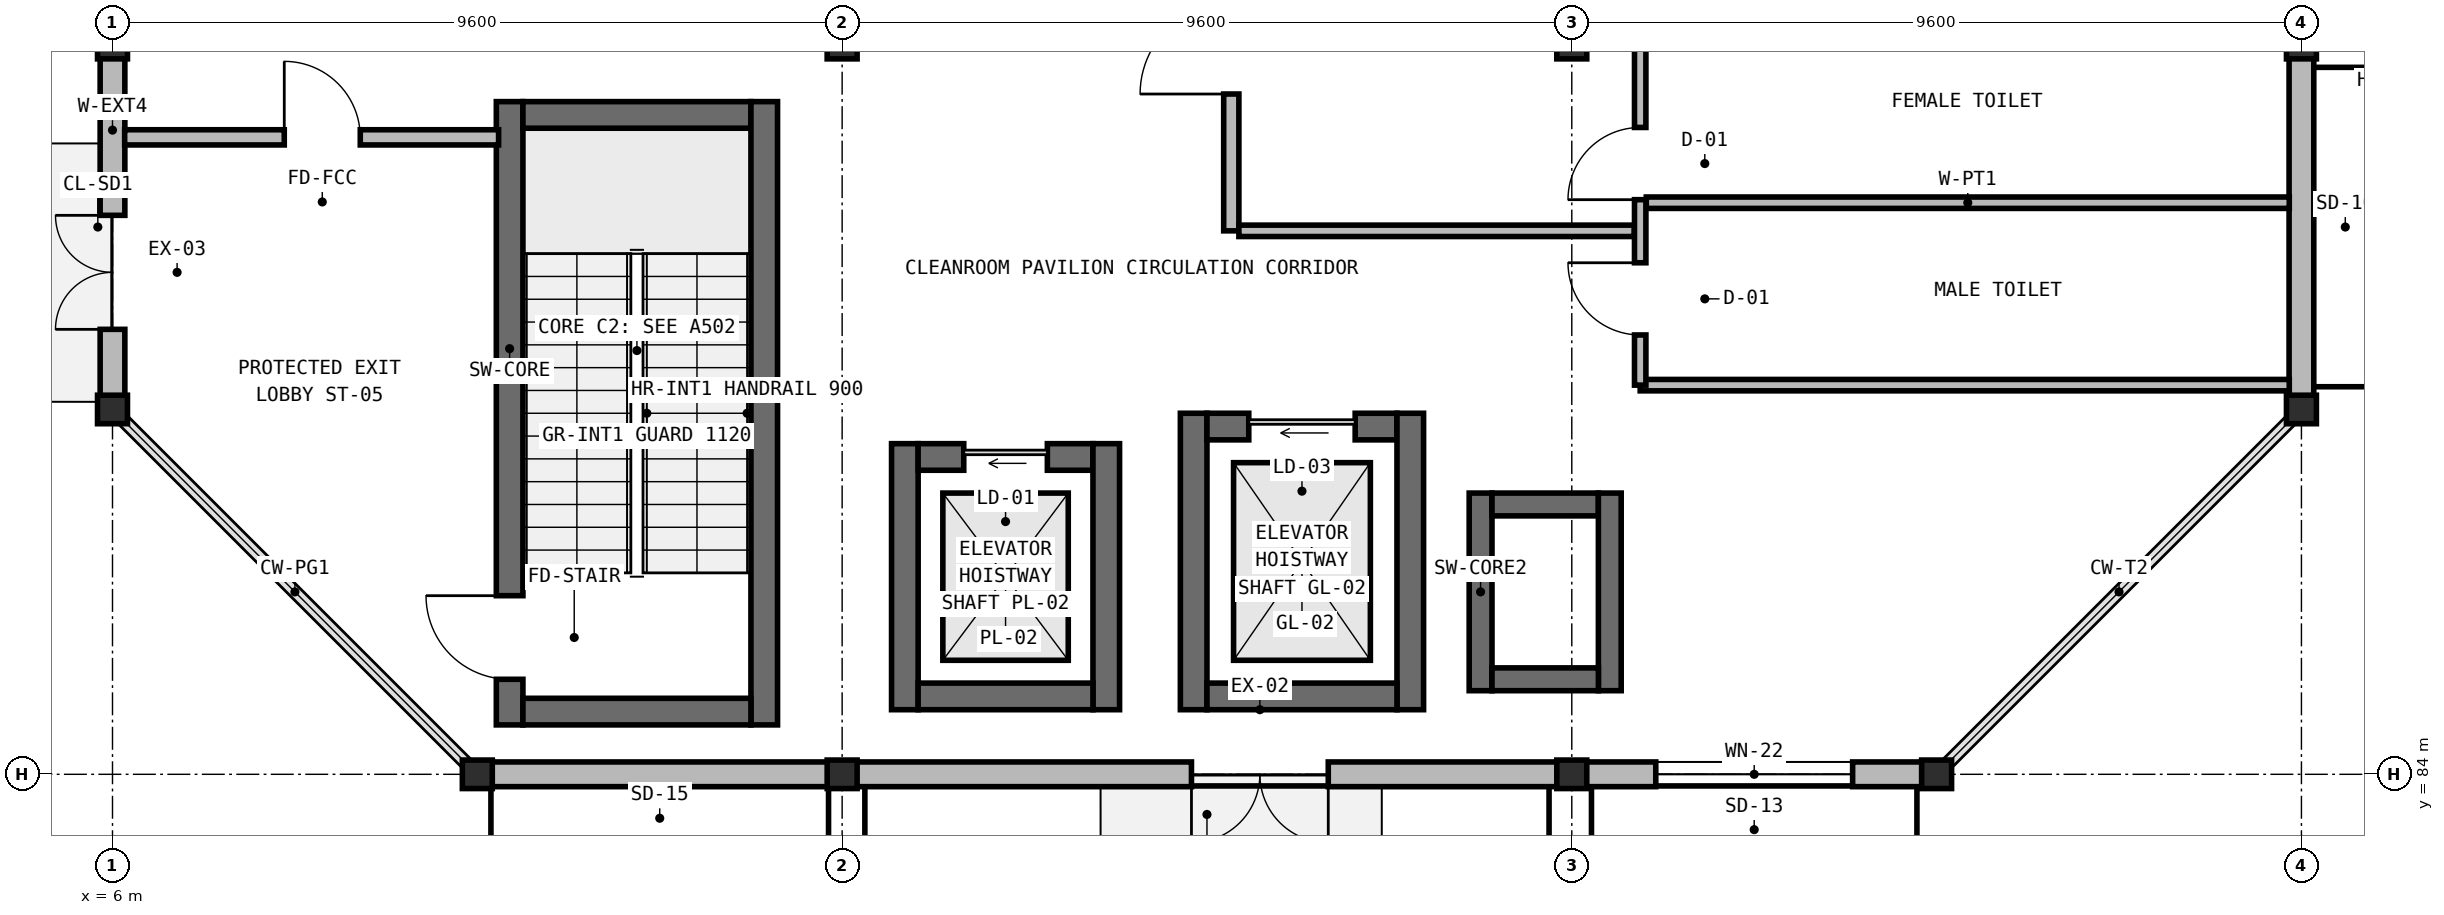
"""IFC4 building model, lengths in metres.
Left out: names, types, materials, properties, quantities, classifications, styles, units other than length and angle.
Written with IfcOpenShell. Run it as: python <this file> out.ifc"""

import sys

from ifc_helpers import new_model, si_unit, direction, frame, frame_2d, origin, origin_2d, place, context, subcontext, project, spatial, rectangle, i_section, extrude, element, fill, save


model = new_model("IFC4")
c1 = context("Model", 3, precision=1e-05, world=origin(), true_north=direction((0.0, 1.0)))
c2 = subcontext(c1, "Body", "Model", "MODEL_VIEW")
j1 = project(units=[si_unit("LENGTHUNIT", "METRE"), si_unit("PLANEANGLEUNIT", "RADIAN")], contexts=[c1])
p1 = place(None, origin())
s1 = spatial("IfcSite", under=j1, at=p1, CompositionType="ELEMENT")
p2 = place(p1, origin())
s2 = spatial("IfcBuilding", under=s1, at=p2, CompositionType="ELEMENT")
p3 = place(p2, origin())
s3 = spatial("IfcBuildingStorey", under=s2, at=p3, CompositionType="ELEMENT", Elevation=0.0)
p4 = place(p3, frame((11.225, 84.65, 0.0), z_axis=(0.0, 0.0, 1.0), x_axis=(0.0, 1.0, 0.0)))
e1 = element("IfcWall", 1, at=p4, inside=s3, PredefinedType="SHEAR", context=c2, shape_type="SweptSolid", body=[
    extrude(rectangle(XDim=8.2, YDim=0.35, at=frame_2d((4.1, 0.0))), origin(), (0.0, 0.0, 1.0), 5.25),
])
p5 = place(p4, frame((0.6, 0.0, 0.0)))
e2 = element("IfcOpeningElement", 2, at=p5, cuts=e1, PredefinedType="OPENING", context=c2, shape_type="SweptSolid", body=[
    extrude(rectangle(XDim=1.1, YDim=2.15, at=frame_2d((0.55, 1.075))), frame((0.0, 0.185, 0.0), z_axis=(0.0, -1.0, 0.0), x_axis=(1.0, 0.0, 0.0)), (0.0, 0.0, 1.0), 0.37),
])
p6 = place(p3, frame((11.4, 92.675, 0.0), z_axis=(0.0, 0.0, 1.0), x_axis=(1.0, 0.0, 0.0)))
e3 = element("IfcWall", 3, at=p6, inside=s3, PredefinedType="SHEAR", context=c2, shape_type="SweptSolid", body=[
    extrude(rectangle(XDim=3.0, YDim=0.35, at=frame_2d((1.5, 0.0))), origin(), (0.0, 0.0, 1.0), 5.25),
])
p7 = place(p3, frame((14.575, 92.85, 0.0), z_axis=(0.0, 0.0, 1.0), x_axis=(0.0, -1.0, 0.0)))
e4 = element("IfcWall", 4, at=p7, inside=s3, PredefinedType="SHEAR", context=c2, shape_type="SweptSolid", body=[
    extrude(rectangle(XDim=8.2, YDim=0.35, at=frame_2d((4.1, 0.0))), origin(), (0.0, 0.0, 1.0), 5.25),
])
p8 = place(p3, frame((14.4, 84.825, 0.0), z_axis=(0.0, 0.0, 1.0), x_axis=(-1.0, 0.0, 0.0)))
e5 = element("IfcWall", 5, at=p8, inside=s3, PredefinedType="SHEAR", context=c2, shape_type="SweptSolid", body=[
    extrude(rectangle(XDim=3.0, YDim=0.35, at=frame_2d((1.5, 0.0))), origin(), (0.0, 0.0, 1.0), 5.25),
])
p9 = place(p3, frame((16.425, 84.85, 0.0), z_axis=(0.0, 0.0, 1.0), x_axis=(0.0, 1.0, 0.0)))
e6 = element("IfcWall", 6, at=p9, inside=s3, PredefinedType="SHEAR", context=c2, shape_type="SweptSolid", body=[
    extrude(rectangle(XDim=3.5, YDim=0.35, at=frame_2d((1.75, 0.0))), origin(), (0.0, 0.0, 1.0), 5.25),
])
p10 = place(p3, frame((16.6, 88.175, 0.0), z_axis=(0.0, 0.0, 1.0), x_axis=(1.0, 0.0, 0.0)))
e7 = element("IfcWall", 7, at=p10, inside=s3, PredefinedType="SHEAR", context=c2, shape_type="SweptSolid", body=[
    extrude(rectangle(XDim=2.3, YDim=0.35, at=frame_2d((1.15, 0.0))), origin(), (0.0, 0.0, 1.0), 5.25),
])
p11 = place(p10, frame((0.6, 0.0, 0.0)))
e8 = element("IfcOpeningElement", 8, at=p11, cuts=e7, PredefinedType="OPENING", context=c2, shape_type="SweptSolid", body=[
    extrude(rectangle(XDim=1.1, YDim=2.15, at=frame_2d((0.55, 1.075))), frame((0.0, 0.185, 0.0), z_axis=(0.0, -1.0, 0.0), x_axis=(1.0, 0.0, 0.0)), (0.0, 0.0, 1.0), 0.37),
])
p12 = place(p3, frame((19.075, 88.35, 0.0), z_axis=(0.0, 0.0, 1.0), x_axis=(0.0, -1.0, 0.0)))
e9 = element("IfcWall", 9, at=p12, inside=s3, PredefinedType="SHEAR", context=c2, shape_type="SweptSolid", body=[
    extrude(rectangle(XDim=3.5, YDim=0.35, at=frame_2d((1.75, 0.0))), origin(), (0.0, 0.0, 1.0), 5.25),
])
p13 = place(p3, frame((18.9, 85.025, 0.0), z_axis=(0.0, 0.0, 1.0), x_axis=(-1.0, 0.0, 0.0)))
e10 = element("IfcWall", 10, at=p13, inside=s3, PredefinedType="SHEAR", context=c2, shape_type="SweptSolid", body=[
    extrude(rectangle(XDim=2.3, YDim=0.35, at=frame_2d((1.15, 0.0))), origin(), (0.0, 0.0, 1.0), 5.25),
])
p14 = place(p3, frame((20.225, 84.85, 0.0), z_axis=(0.0, 0.0, 1.0), x_axis=(0.0, 1.0, 0.0)))
e11 = element("IfcWall", 11, at=p14, inside=s3, PredefinedType="SHEAR", context=c2, shape_type="SweptSolid", body=[
    extrude(rectangle(XDim=3.9, YDim=0.35, at=frame_2d((1.95, 0.0))), origin(), (0.0, 0.0, 1.0), 5.25),
])
p15 = place(p3, frame((20.4, 88.575, 0.0), z_axis=(0.0, 0.0, 1.0), x_axis=(1.0, 0.0, 0.0)))
e12 = element("IfcWall", 12, at=p15, inside=s3, PredefinedType="SHEAR", context=c2, shape_type="SweptSolid", body=[
    extrude(rectangle(XDim=2.5, YDim=0.35, at=frame_2d((1.25, 0.0))), origin(), (0.0, 0.0, 1.0), 5.25),
])
p16 = place(p15, frame((0.55, 0.0, 0.0)))
e13 = element("IfcOpeningElement", 13, at=p16, cuts=e12, PredefinedType="OPENING", context=c2, shape_type="SweptSolid", body=[
    extrude(rectangle(XDim=1.4, YDim=2.3, at=frame_2d((0.7, 1.15))), frame((0.0, 0.185, 0.0), z_axis=(0.0, -1.0, 0.0), x_axis=(1.0, 0.0, 0.0)), (0.0, 0.0, 1.0), 0.37),
])
p17 = place(p3, frame((23.075, 88.75, 0.0), z_axis=(0.0, 0.0, 1.0), x_axis=(0.0, -1.0, 0.0)))
e14 = element("IfcWall", 14, at=p17, inside=s3, PredefinedType="SHEAR", context=c2, shape_type="SweptSolid", body=[
    extrude(rectangle(XDim=3.9, YDim=0.35, at=frame_2d((1.95, 0.0))), origin(), (0.0, 0.0, 1.0), 5.25),
])
p18 = place(p3, frame((22.9, 85.025, 0.0), z_axis=(0.0, 0.0, 1.0), x_axis=(-1.0, 0.0, 0.0)))
e15 = element("IfcWall", 15, at=p18, inside=s3, PredefinedType="SHEAR", context=c2, shape_type="SweptSolid", body=[
    extrude(rectangle(XDim=2.5, YDim=0.35, at=frame_2d((1.25, 0.0))), origin(), (0.0, 0.0, 1.0), 5.25),
])
for number, where, z_axis, x_axis in (
    (16, (6.0, 93.6, 0.0), (0.0, 0.0, 1.0), (1.0, 0.0, 0.0)),
    (17, (15.6, 84.0, 0.0), (0.0, 0.0, 1.0), (1.0, 0.0, 0.0)),
    (18, (15.6, 93.6, 0.0), (0.0, 0.0, 1.0), (1.0, 0.0, 0.0)),
    (19, (25.2, 84.0, 0.0), (0.0, 0.0, 1.0), (1.0, 0.0, 0.0)),
    (20, (25.2, 93.6, 0.0), (0.0, 0.0, 1.0), (1.0, 0.0, 0.0)),
    (21, (34.8, 93.6, 0.0), (0.0, 0.0, 1.0), (1.0, 0.0, 0.0)),
    (22, (10.8, 84.0, 0.0), (0.0, 0.0, 1.0), (1.0, 0.0, 0.0)),
    (23, (30.0, 84.0, 0.0), (0.0, 0.0, 1.0), (1.0, 0.0, 0.0)),
    (24, (34.8, 88.8, 0.0), (0.0, 0.0, 1.0), (1.0, 0.0, 0.0)),
    (25, (6.0, 88.8, 0.0), (0.0, 0.0, 1.0), (1.0, 0.0, 0.0)),
):
    element("IfcColumn", number, at=place(p3, frame(where, z_axis=z_axis, x_axis=x_axis)), inside=s3, PredefinedType="COLUMN", context=c2, shape_type="SweptSolid", body=[
        extrude(i_section(OverallWidth=0.394, OverallDepth=0.375, WebThickness=0.02, FlangeThickness=0.032, at=origin_2d()), origin(), (0.0, 0.0, 1.0), 5.25),
    ])
p19 = place(p3, frame((24.0, 85.1, 0.0), z_axis=(0.0, 0.0, 1.0), x_axis=(0.0, 1.0, 0.0)))
e26 = element("IfcWall", 26, at=p19, inside=s3, PredefinedType="SHEAR", context=c2, shape_type="SweptSolid", body=[
    extrude(rectangle(XDim=2.6, YDim=0.3, at=frame_2d((1.3, 0.0))), origin(), (0.0, 0.0, 1.0), 5.07),
])
p20 = place(p3, frame((24.15, 87.55, 0.0), z_axis=(0.0, 0.0, 1.0), x_axis=(1.0, 0.0, 0.0)))
e27 = element("IfcWall", 27, at=p20, inside=s3, PredefinedType="SHEAR", context=c2, shape_type="SweptSolid", body=[
    extrude(rectangle(XDim=1.4, YDim=0.3, at=frame_2d((0.7, 0.0))), origin(), (0.0, 0.0, 1.0), 5.07),
])
p21 = place(p3, frame((25.7, 87.7, 0.0), z_axis=(0.0, 0.0, 1.0), x_axis=(0.0, -1.0, 0.0)))
e28 = element("IfcWall", 28, at=p21, inside=s3, PredefinedType="SHEAR", context=c2, shape_type="SweptSolid", body=[
    extrude(rectangle(XDim=2.6, YDim=0.3, at=frame_2d((1.3, 0.0))), origin(), (0.0, 0.0, 1.0), 5.07),
])
p22 = place(p3, frame((25.55, 85.25, 0.0), z_axis=(0.0, 0.0, 1.0), x_axis=(-1.0, 0.0, 0.0)))
e29 = element("IfcWall", 29, at=p22, inside=s3, PredefinedType="SHEAR", context=c2, shape_type="SweptSolid", body=[
    extrude(rectangle(XDim=1.4, YDim=0.3, at=frame_2d((0.7, 0.0))), origin(), (0.0, 0.0, 1.0), 5.07),
])
p23 = place(p3, frame((6.0, 88.804, 0.0), z_axis=(0.0, 0.0, 1.0), x_axis=(0.0, 1.0, 0.0)))
e30 = element("IfcWall", 30, at=p23, inside=s3, PredefinedType="SOLIDWALL", context=c2, shape_type="SweptSolid", body=[
    extrude(rectangle(XDim=4.792, YDim=0.325, at=frame_2d((2.396, 0.0))), origin(), (0.0, 0.0, 1.0), 4.93),
])
p24 = place(p23, frame((1.05, 0.0, 0.0)))
e31 = element("IfcOpeningElement", 31, at=p24, cuts=e30, PredefinedType="OPENING", context=c2, shape_type="SweptSolid", body=[
    extrude(rectangle(XDim=1.5, YDim=2.2, at=frame_2d((0.75, 1.1))), frame((0.0, 0.172, 0.0), z_axis=(0.0, -1.0, 0.0), x_axis=(1.0, 0.0, 0.0)), (0.0, 0.0, 1.0), 0.345),
])
p25 = place(p3, frame((34.8, 93.596, 0.0), z_axis=(0.0, 0.0, 1.0), x_axis=(0.0, -1.0, 0.0)))
e32 = element("IfcWall", 32, at=p25, inside=s3, PredefinedType="SOLIDWALL", context=c2, shape_type="SweptSolid", body=[
    extrude(rectangle(XDim=4.792, YDim=0.325, at=frame_2d((2.396, 0.0))), origin(), (0.0, 0.0, 1.0), 4.93),
])
p26 = place(p3, frame((29.996, 84.0, 0.0), z_axis=(0.0, 0.0, 1.0), x_axis=(-1.0, 0.0, 0.0)))
e33 = element("IfcWall", 33, at=p26, inside=s3, PredefinedType="SOLIDWALL", context=c2, shape_type="SweptSolid", body=[
    extrude(rectangle(XDim=4.792, YDim=0.325, at=frame_2d((2.396, 0.0))), origin(), (0.0, 0.0, 1.0), 4.93),
])
p27 = place(p26, frame((1.101, 0.0, 0.95)))
e34 = element("IfcOpeningElement", 34, at=p27, cuts=e33, PredefinedType="OPENING", context=c2, shape_type="SweptSolid", body=[
    extrude(rectangle(XDim=2.59, YDim=2.0, at=frame_2d((1.295, 1.0))), frame((0.0, 0.172, 0.0), z_axis=(0.0, -1.0, 0.0), x_axis=(1.0, 0.0, 0.0)), (0.0, 0.0, 1.0), 0.345),
])
p28 = place(p3, frame((25.196, 84.0, 0.0), z_axis=(0.0, 0.0, 1.0), x_axis=(-1.0, 0.0, 0.0)))
e35 = element("IfcWall", 35, at=p28, inside=s3, PredefinedType="SOLIDWALL", context=c2, shape_type="SweptSolid", body=[
    extrude(rectangle(XDim=9.592, YDim=0.325, at=frame_2d((4.796, 0.0))), origin(), (0.0, 0.0, 1.0), 4.444),
])
p29 = place(p28, frame((3.2, 0.0, 0.0)))
e36 = element("IfcOpeningElement", 36, at=p29, cuts=e35, PredefinedType="OPENING", context=c2, shape_type="SweptSolid", body=[
    extrude(rectangle(XDim=1.8, YDim=2.25, at=frame_2d((0.9, 1.125))), frame((0.0, 0.172, 0.0), z_axis=(0.0, -1.0, 0.0), x_axis=(1.0, 0.0, 0.0)), (0.0, 0.0, 1.0), 0.345),
])
p30 = place(p3, frame((15.596, 84.0, 0.0), z_axis=(0.0, 0.0, 1.0), x_axis=(-1.0, 0.0, 0.0)))
e37 = element("IfcWall", 37, at=p30, inside=s3, PredefinedType="SOLIDWALL", context=c2, shape_type="SweptSolid", body=[
    extrude(rectangle(XDim=4.792, YDim=0.325, at=frame_2d((2.396, 0.0))), origin(), (0.0, 0.0, 1.0), 4.93),
])
p31 = place(p3, frame((6.16, 92.38, 0.0), z_axis=(0.0, 0.0, 1.0), x_axis=(1.0, 0.0, 0.0)))
e38 = element("IfcWall", 38, at=p31, inside=s3, PredefinedType="SOLIDWALL", context=c2, shape_type="SweptSolid", body=[
    extrude(rectangle(XDim=4.92, YDim=0.2, at=frame_2d((2.46, 0.0))), origin(), (0.0, 0.0, 1.0), 4.93),
])
p32 = place(p31, frame((2.1, 0.0, 0.0)))
e39 = element("IfcOpeningElement", 39, at=p32, cuts=e38, PredefinedType="OPENING", context=c2, shape_type="SweptSolid", body=[
    extrude(rectangle(XDim=1.0, YDim=2.15, at=frame_2d((0.5, 1.075))), frame((0.0, 0.11, 0.0), z_axis=(0.0, -1.0, 0.0), x_axis=(1.0, 0.0, 0.0)), (0.0, 0.0, 1.0), 0.22),
])
p33 = place(p3, frame((26.18, 91.52, 0.0), z_axis=(0.0, 0.0, 1.0), x_axis=(1.0, 0.0, 0.0)))
e40 = element("IfcWall", 40, at=p33, inside=s3, PredefinedType="PARTITIONING", context=c2, shape_type="SweptSolid", body=[
    extrude(rectangle(XDim=8.46, YDim=0.15, at=frame_2d((4.23, 0.0))), origin(), (0.0, 0.0, 1.0), 4.93),
])
p34 = place(p3, frame((26.1, 89.12, 0.0), z_axis=(0.0, 0.0, 1.0), x_axis=(1.0, 0.0, 0.0)))
e41 = element("IfcWall", 41, at=p34, inside=s3, PredefinedType="PARTITIONING", context=c2, shape_type="SweptSolid", body=[
    extrude(rectangle(XDim=8.54, YDim=0.15, at=frame_2d((4.27, 0.0))), origin(), (0.0, 0.0, 1.0), 4.93),
])
p35 = place(p3, frame((26.1, 89.12, 0.0), z_axis=(0.0, 0.0, 1.0), x_axis=(0.0, 1.0, 0.0)))
e42 = element("IfcWall", 42, at=p35, inside=s3, PredefinedType="PARTITIONING", context=c2, shape_type="SweptSolid", body=[
    extrude(rectangle(XDim=7.53, YDim=0.15, at=frame_2d((3.765, 0.0))), origin(), (0.0, 0.0, 1.0), 4.93),
])
p36 = place(p35, frame((0.66, 0.0, 0.0)))
e43 = element("IfcOpeningElement", 43, at=p36, cuts=e42, PredefinedType="OPENING", context=c2, shape_type="SweptSolid", body=[
    extrude(rectangle(XDim=0.95, YDim=2.1, at=frame_2d((0.475, 1.05))), frame((0.0, 0.085, 0.0), z_axis=(0.0, -1.0, 0.0), x_axis=(1.0, 0.0, 0.0)), (0.0, 0.0, 1.0), 0.17),
])
p37 = place(p35, frame((2.44, 0.0, 0.0)))
e44 = element("IfcOpeningElement", 44, at=p37, cuts=e42, PredefinedType="OPENING", context=c2, shape_type="SweptSolid", body=[
    extrude(rectangle(XDim=0.95, YDim=2.1, at=frame_2d((0.475, 1.05))), frame((0.0, 0.085, 0.0), z_axis=(0.0, -1.0, 0.0), x_axis=(1.0, 0.0, 0.0)), (0.0, 0.0, 1.0), 0.17),
])
p38 = place(p35, frame((5.64, 0.0, 0.0)))
e45 = element("IfcOpeningElement", 45, at=p38, cuts=e42, PredefinedType="OPENING", context=c2, shape_type="SweptSolid", body=[
    extrude(rectangle(XDim=0.95, YDim=2.1, at=frame_2d((0.475, 1.05))), frame((0.0, 0.085, 0.0), z_axis=(0.0, -1.0, 0.0), x_axis=(1.0, 0.0, 0.0)), (0.0, 0.0, 1.0), 0.17),
])
p39 = place(p3, frame((20.72, 91.15, 0.0), z_axis=(0.0, 0.0, 1.0), x_axis=(0.0, 1.0, 0.0)))
e46 = element("IfcWall", 46, at=p39, inside=s3, PredefinedType="SOLIDWALL", context=c2, shape_type="SweptSolid", body=[
    extrude(rectangle(XDim=12.8, YDim=0.2, at=frame_2d((6.4, 0.0))), origin(), (0.0, 0.0, 1.0), 4.93),
])
p40 = place(p39, frame((1.8, 0.0, 0.0)))
e47 = element("IfcOpeningElement", 47, at=p40, cuts=e46, PredefinedType="OPENING", context=c2, shape_type="SweptSolid", body=[
    extrude(rectangle(XDim=1.2, YDim=2.2, at=frame_2d((0.6, 1.1))), frame((0.0, 0.11, 0.0), z_axis=(0.0, -1.0, 0.0), x_axis=(1.0, 0.0, 0.0)), (0.0, 0.0, 1.0), 0.22),
])
p41 = place(p39, frame((6.8, 0.0, 0.0)))
e48 = element("IfcOpeningElement", 48, at=p41, cuts=e46, PredefinedType="OPENING", context=c2, shape_type="SweptSolid", body=[
    extrude(rectangle(XDim=1.35, YDim=2.2, at=frame_2d((0.675, 1.1))), frame((0.0, 0.11, 0.0), z_axis=(0.0, -1.0, 0.0), x_axis=(1.0, 0.0, 0.0)), (0.0, 0.0, 1.0), 0.22),
])
p42 = place(p3, frame((20.82, 91.15, 0.0), z_axis=(0.0, 0.0, 1.0), x_axis=(1.0, 0.0, 0.0)))
e49 = element("IfcWall", 49, at=p42, inside=s3, PredefinedType="PARTITIONING", context=c2, shape_type="SweptSolid", body=[
    extrude(rectangle(XDim=5.2, YDim=0.15, at=frame_2d((2.6, 0.0))), origin(), (0.0, 0.0, 1.0), 4.93),
])
p43 = place(p24, origin())
e50 = element("IfcDoor", 50, at=p43, inside=s3, OperationType="DOUBLE_DOOR_SINGLE_SWING", PredefinedType="DOOR", context=c2, shape_type="SweptSolid", body=[
    extrude(rectangle(XDim=1.5, YDim=2.2, at=frame_2d((0.75, 1.1))), frame((0.0, 0.025, 0.0), z_axis=(0.0, -1.0, 0.0), x_axis=(1.0, 0.0, 0.0)), (0.0, 0.0, 1.0), 0.05),
])
fill(e31, e50)
p44 = place(p27, origin())
e51 = element("IfcWindow", 51, at=p44, inside=s3, PartitioningType="SINGLE_PANEL", PredefinedType="WINDOW", context=c2, shape_type="SweptSolid", body=[
    extrude(rectangle(XDim=2.59, YDim=2.0, at=frame_2d((1.295, 1.0))), frame((0.0, 0.03, 0.0), z_axis=(0.0, -1.0, 0.0), x_axis=(1.0, 0.0, 0.0)), (0.0, 0.0, 1.0), 0.06),
])
fill(e34, e51)
p45 = place(p29, origin())
e52 = element("IfcDoor", 52, at=p45, inside=s3, OperationType="DOUBLE_DOOR_SINGLE_SWING", PredefinedType="DOOR", context=c2, shape_type="SweptSolid", body=[
    extrude(rectangle(XDim=1.8, YDim=2.25, at=frame_2d((0.9, 1.125))), frame((0.0, 0.025, 0.0), z_axis=(0.0, -1.0, 0.0), x_axis=(1.0, 0.0, 0.0)), (0.0, 0.0, 1.0), 0.05),
])
fill(e36, e52)
p46 = place(p5, origin())
e53 = element("IfcDoor", 53, at=p46, inside=s3, OperationType="SINGLE_SWING_RIGHT", PredefinedType="DOOR", context=c2, shape_type="SweptSolid", body=[
    extrude(rectangle(XDim=1.1, YDim=2.15, at=frame_2d((0.55, 1.075))), frame((0.0, 0.025, 0.0), z_axis=(0.0, -1.0, 0.0), x_axis=(1.0, 0.0, 0.0)), (0.0, 0.0, 1.0), 0.05),
])
fill(e2, e53)
p47 = place(p11, origin())
e54 = element("IfcDoor", 54, at=p47, inside=s3, OperationType="SLIDING_TO_LEFT", PredefinedType="USERDEFINED", context=c2, shape_type="SweptSolid", body=[
    extrude(rectangle(XDim=1.1, YDim=2.15, at=frame_2d((0.55, 1.075))), frame((0.0, 0.025, 0.0), z_axis=(0.0, -1.0, 0.0), x_axis=(1.0, 0.0, 0.0)), (0.0, 0.0, 1.0), 0.05),
])
fill(e8, e54)
p48 = place(p16, origin())
e55 = element("IfcDoor", 55, at=p48, inside=s3, OperationType="SLIDING_TO_LEFT", PredefinedType="USERDEFINED", context=c2, shape_type="SweptSolid", body=[
    extrude(rectangle(XDim=1.4, YDim=2.3, at=frame_2d((0.7, 1.15))), frame((0.0, 0.025, 0.0), z_axis=(0.0, -1.0, 0.0), x_axis=(1.0, 0.0, 0.0)), (0.0, 0.0, 1.0), 0.05),
])
fill(e13, e55)
p49 = place(p32, origin())
e56 = element("IfcDoor", 56, at=p49, inside=s3, OperationType="SINGLE_SWING_LEFT", PredefinedType="DOOR", context=c2, shape_type="SweptSolid", body=[
    extrude(rectangle(XDim=1.0, YDim=2.15, at=frame_2d((0.5, 1.075))), frame((0.0, 0.025, 0.0), z_axis=(0.0, -1.0, 0.0), x_axis=(1.0, 0.0, 0.0)), (0.0, 0.0, 1.0), 0.05),
])
fill(e39, e56)
p50 = place(p36, origin())
e57 = element("IfcDoor", 57, at=p50, inside=s3, OperationType="SINGLE_SWING_RIGHT", PredefinedType="DOOR", context=c2, shape_type="SweptSolid", body=[
    extrude(rectangle(XDim=0.95, YDim=2.1, at=frame_2d((0.475, 1.05))), frame((0.0, 0.025, 0.0), z_axis=(0.0, -1.0, 0.0), x_axis=(1.0, 0.0, 0.0)), (0.0, 0.0, 1.0), 0.05),
])
fill(e43, e57)
p51 = place(p37, origin())
e58 = element("IfcDoor", 58, at=p51, inside=s3, OperationType="SINGLE_SWING_LEFT", PredefinedType="DOOR", context=c2, shape_type="SweptSolid", body=[
    extrude(rectangle(XDim=0.95, YDim=2.1, at=frame_2d((0.475, 1.05))), frame((0.0, 0.025, 0.0), z_axis=(0.0, -1.0, 0.0), x_axis=(1.0, 0.0, 0.0)), (0.0, 0.0, 1.0), 0.05),
])
fill(e44, e58)
p52 = place(p40, origin())
e59 = element("IfcDoor", 59, at=p52, inside=s3, OperationType="SINGLE_SWING_LEFT", PredefinedType="DOOR", context=c2, shape_type="SweptSolid", body=[
    extrude(rectangle(XDim=1.2, YDim=2.2, at=frame_2d((0.6, 1.1))), frame((0.0, 0.025, 0.0), z_axis=(0.0, -1.0, 0.0), x_axis=(1.0, 0.0, 0.0)), (0.0, 0.0, 1.0), 0.05),
])
fill(e47, e59)
save(model, sys.argv[1])
